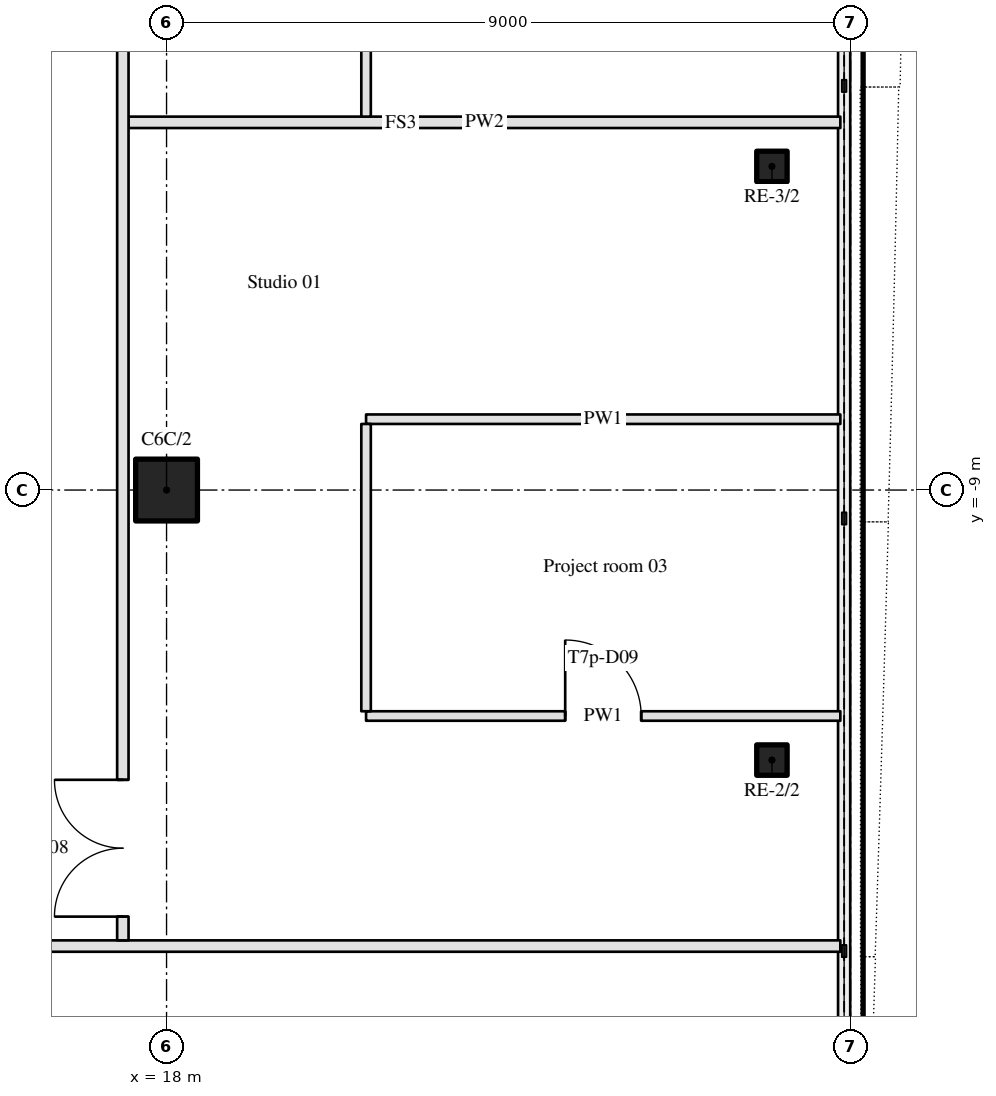
"""IFC4 building model, lengths in metres.
Left out: names, types, materials, properties, quantities, classifications, styles, units other than length and angle.
Written with IfcOpenShell. Run it as: python <this file> out.ifc"""

import sys

from ifc_helpers import new_model, si_unit, direction, frame, frame_2d, origin, origin_2d, place, context, subcontext, project, spatial, rectangle, hollow_rectangle, hollow_circle, extrude, element, fill, save


model = new_model("IFC4")
c1 = context("Model", 3, precision=1e-05, world=origin(), true_north=direction((0.0, 1.0)))
c2 = subcontext(c1, "Body", "Model", "MODEL_VIEW")
j1 = project(units=[si_unit("LENGTHUNIT", "METRE"), si_unit("PLANEANGLEUNIT", "RADIAN")], contexts=[c1])
p1 = place(None, origin())
s1 = spatial("IfcSite", under=j1, at=p1, CompositionType="ELEMENT")
p2 = place(p1, origin())
s2 = spatial("IfcBuilding", under=s1, at=p2, CompositionType="ELEMENT")
p3 = place(p2, frame((0.0, 0.0, 105.0)))
s3 = spatial("IfcBuildingStorey", under=s2, at=p3, CompositionType="ELEMENT", Elevation=105.0)
p4 = place(p3, frame((18.0, -9.0, 0.0), z_axis=(0.0, 0.0, 1.0), x_axis=(1.0, 0.0, 0.0)))
e1 = element("IfcColumn", 1, at=p4, inside=s3, PredefinedType="COLUMN", context=c2, shape_type="SweptSolid", body=[
    extrude(hollow_circle(Radius=0.406, WallThickness=0.036, at=origin_2d()), origin(), (0.0, 0.0, 1.0), 3.9),
])
for number, where, z_axis, x_axis in (
    (2, (25.965, -12.553, 0.0), (0.0, 0.0, 1.0), (1.0, 0.0, 0.0)),
    (3, (25.965, -4.742, 0.0), (0.0, 0.0, 1.0), (1.0, 0.0, 0.0)),
):
    element("IfcColumn", number, at=place(p3, frame(where, z_axis=z_axis, x_axis=x_axis)), inside=s3, PredefinedType="COLUMN", context=c2, shape_type="SweptSolid", body=[
        extrude(hollow_rectangle(XDim=0.4, YDim=0.4, WallThickness=0.025, InnerFilletRadius=0.038, OuterFilletRadius=0.062, at=origin_2d()), origin(), (0.0, 0.0, 1.0), 3.9),
    ])
p5 = place(p3, frame((-20.865, -15.0, 0.0), z_axis=(0.0, 0.0, 1.0), x_axis=(1.0, 0.0, 0.0)))
e4 = element("IfcWall", 4, at=p5, inside=s3, PredefinedType="PARTITIONING", context=c2, shape_type="SweptSolid", body=[
    extrude(rectangle(XDim=47.73, YDim=0.15, at=frame_2d((23.865, 0.0))), origin(), (0.0, 0.0, 1.0), 2.96),
])
p6 = place(p5, frame((11.252, 0.0, 0.0)))
e5 = element("IfcOpeningElement", 5, at=p6, cuts=e4, PredefinedType="OPENING", context=c2, shape_type="SweptSolid", body=[
    extrude(rectangle(XDim=1.8, YDim=2.1, at=frame_2d((0.9, 1.05))), frame((0.0, 0.085, 0.0), z_axis=(0.0, -1.0, 0.0), x_axis=(1.0, 0.0, 0.0)), (0.0, 0.0, 1.0), 0.17),
])
p7 = place(p5, frame((28.678, 0.0, 0.0)))
e6 = element("IfcOpeningElement", 6, at=p7, cuts=e4, PredefinedType="OPENING", context=c2, shape_type="SweptSolid", body=[
    extrude(rectangle(XDim=1.8, YDim=2.1, at=frame_2d((0.9, 1.05))), frame((0.0, 0.085, 0.0), z_axis=(0.0, -1.0, 0.0), x_axis=(1.0, 0.0, 0.0)), (0.0, 0.0, 1.0), 0.17),
])
p8 = place(p3, frame((20.625, -11.973, 0.0), z_axis=(0.0, 0.0, 1.0), x_axis=(1.0, 0.0, 0.0)))
e7 = element("IfcWall", 7, at=p8, inside=s3, PredefinedType="PARTITIONING", context=c2, shape_type="SweptSolid", body=[
    extrude(rectangle(XDim=6.24, YDim=0.125, at=frame_2d((3.12, 0.0))), origin(), (0.0, 0.0, 1.0), 2.96),
])
p9 = place(p8, frame((2.62, 0.0, 0.0)))
e8 = element("IfcOpeningElement", 8, at=p9, cuts=e7, PredefinedType="OPENING", context=c2, shape_type="SweptSolid", body=[
    extrude(rectangle(XDim=1.0, YDim=2.1, at=frame_2d((0.5, 1.05))), frame((0.0, 0.073, 0.0), z_axis=(0.0, -1.0, 0.0), x_axis=(1.0, 0.0, 0.0)), (0.0, 0.0, 1.0), 0.145),
])
p10 = place(p3, frame((20.625, -8.068, 0.0), z_axis=(0.0, 0.0, 1.0), x_axis=(1.0, 0.0, 0.0)))
e9 = element("IfcWall", 9, at=p10, inside=s3, PredefinedType="PARTITIONING", context=c2, shape_type="SweptSolid", body=[
    extrude(rectangle(XDim=6.24, YDim=0.125, at=frame_2d((3.12, 0.0))), origin(), (0.0, 0.0, 1.0), 2.96),
])
p11 = place(p3, frame((17.5, -4.162, 0.0), z_axis=(0.0, 0.0, 1.0), x_axis=(1.0, 0.0, 0.0)))
e10 = element("IfcWall", 10, at=p11, inside=s3, PredefinedType="PARTITIONING", context=c2, shape_type="SweptSolid", body=[
    extrude(rectangle(XDim=9.365, YDim=0.15, at=frame_2d((4.683, 0.0))), origin(), (0.0, 0.0, 1.0), 2.96),
])
p12 = place(p3, frame((17.425, -14.925, 0.0), z_axis=(0.0, 0.0, 1.0), x_axis=(0.0, 1.0, 0.0)))
e11 = element("IfcWall", 11, at=p12, inside=s3, PredefinedType="PARTITIONING", context=c2, shape_type="SweptSolid", body=[
    extrude(rectangle(XDim=26.405, YDim=0.15, at=frame_2d((13.203, 0.0))), origin(), (0.0, 0.0, 1.0), 2.96),
])
p13 = place(p12, frame((0.312, 0.0, 0.0)))
e12 = element("IfcOpeningElement", 12, at=p13, cuts=e11, PredefinedType="OPENING", context=c2, shape_type="SweptSolid", body=[
    extrude(rectangle(XDim=1.8, YDim=2.1, at=frame_2d((0.9, 1.05))), frame((0.0, 0.085, 0.0), z_axis=(0.0, -1.0, 0.0), x_axis=(1.0, 0.0, 0.0)), (0.0, 0.0, 1.0), 0.17),
])
p14 = place(p12, frame((12.592, 0.0, 0.0)))
e13 = element("IfcOpeningElement", 13, at=p14, cuts=e11, PredefinedType="OPENING", context=c2, shape_type="SweptSolid", body=[
    extrude(rectangle(XDim=1.8, YDim=2.1, at=frame_2d((0.9, 1.05))), frame((0.0, 0.085, 0.0), z_axis=(0.0, -1.0, 0.0), x_axis=(1.0, 0.0, 0.0)), (0.0, 0.0, 1.0), 0.17),
])
p15 = place(p12, frame((21.551, 0.0, 0.0)))
e14 = element("IfcOpeningElement", 14, at=p15, cuts=e11, PredefinedType="OPENING", context=c2, shape_type="SweptSolid", body=[
    extrude(rectangle(XDim=1.8, YDim=2.1, at=frame_2d((0.9, 1.05))), frame((0.0, 0.085, 0.0), z_axis=(0.0, -1.0, 0.0), x_axis=(1.0, 0.0, 0.0)), (0.0, 0.0, 1.0), 0.17),
])
p16 = place(p3, frame((20.625, -11.91, 0.0), z_axis=(0.0, 0.0, 1.0), x_axis=(0.0, 1.0, 0.0)))
e15 = element("IfcWall", 15, at=p16, inside=s3, PredefinedType="PARTITIONING", context=c2, shape_type="SweptSolid", body=[
    extrude(rectangle(XDim=3.78, YDim=0.125, at=frame_2d((1.89, 0.0))), origin(), (0.0, 0.0, 1.0), 2.96),
])
p17 = place(p3, frame((20.625, 11.48, 0.0), z_axis=(0.0, 0.0, 1.0), x_axis=(0.0, -1.0, 0.0)))
e16 = element("IfcWall", 16, at=p17, inside=s3, PredefinedType="PARTITIONING", context=c2, shape_type="SweptSolid", body=[
    extrude(rectangle(XDim=15.567, YDim=0.125, at=frame_2d((7.783, 0.0))), origin(), (0.0, 0.0, 1.0), 2.96),
])
p18 = place(p17, frame((11.199, 0.0, 0.0)))
e17 = element("IfcOpeningElement", 17, at=p18, cuts=e16, PredefinedType="OPENING", context=c2, shape_type="SweptSolid", body=[
    extrude(rectangle(XDim=1.0, YDim=2.1, at=frame_2d((0.5, 1.05))), frame((0.0, 0.073, 0.0), z_axis=(0.0, -1.0, 0.0), x_axis=(1.0, 0.0, 0.0)), (0.0, 0.0, 1.0), 0.145),
])
p19 = place(p17, frame((3.466, 0.0, 0.0)))
e18 = element("IfcOpeningElement", 18, at=p19, cuts=e16, PredefinedType="OPENING", context=c2, shape_type="SweptSolid", body=[
    extrude(rectangle(XDim=0.9, YDim=2.1, at=frame_2d((0.45, 1.05))), frame((0.0, 0.073, 0.0), z_axis=(0.0, -1.0, 0.0), x_axis=(1.0, 0.0, 0.0)), (0.0, 0.0, 1.0), 0.145),
])
p20 = place(p13, origin())
e19 = element("IfcDoor", 19, at=p20, inside=s3, OperationType="DOUBLE_DOOR_SINGLE_SWING", PredefinedType="DOOR", context=c2, shape_type="SweptSolid", body=[
    extrude(rectangle(XDim=1.8, YDim=2.1, at=frame_2d((0.9, 1.05))), frame((0.0, 0.025, 0.0), z_axis=(0.0, -1.0, 0.0), x_axis=(1.0, 0.0, 0.0)), (0.0, 0.0, 1.0), 0.05),
])
fill(e12, e19)
p21 = place(p9, origin())
e20 = element("IfcDoor", 20, at=p21, inside=s3, OperationType="SINGLE_SWING_LEFT", PredefinedType="DOOR", context=c2, shape_type="SweptSolid", body=[
    extrude(rectangle(XDim=1.0, YDim=2.1, at=frame_2d((0.5, 1.05))), frame((0.0, 0.025, 0.0), z_axis=(0.0, -1.0, 0.0), x_axis=(1.0, 0.0, 0.0)), (0.0, 0.0, 1.0), 0.05),
])
fill(e8, e20)
save(model, sys.argv[1])
